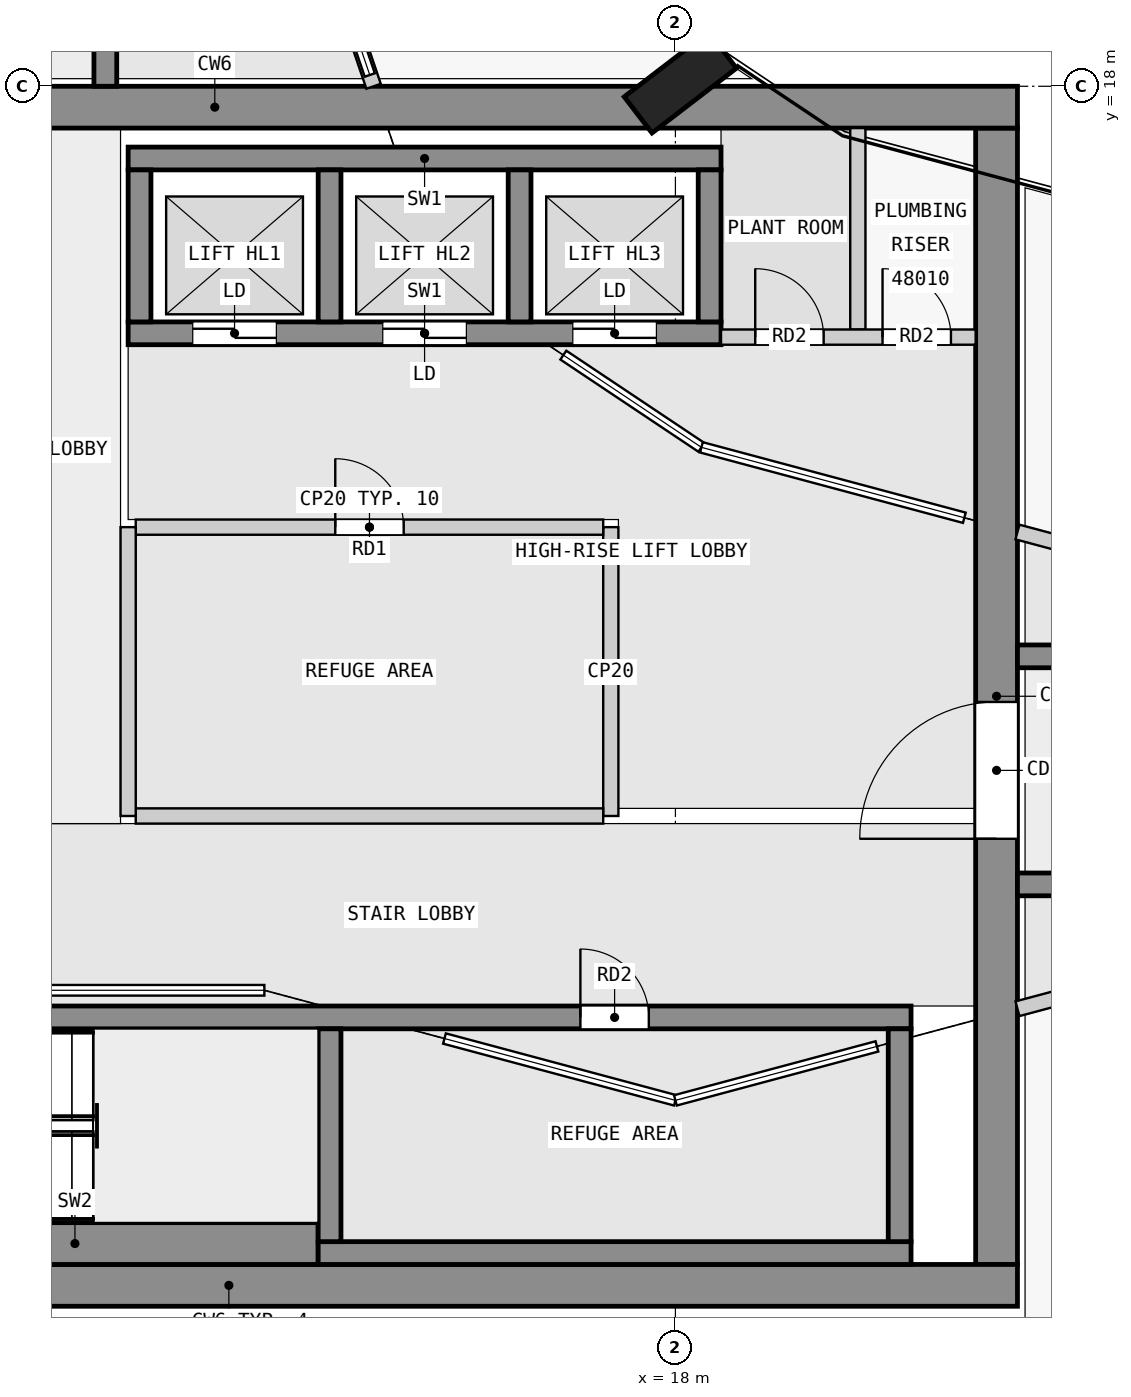
"""IFC4 building model, lengths in metres.
Left out: names, types, materials, properties, quantities, classifications, styles, units other than length and angle.
Written with IfcOpenShell. Run it as: python <this file> out.ifc"""

import sys

from ifc_helpers import new_model, si_unit, direction, frame, frame_2d, origin, origin_2d, place, context, subcontext, project, spatial, rectangle, extrude, element, fill, save


model = new_model("IFC4")
c1 = context("Model", 3, precision=1e-05, world=origin(), true_north=direction((0.0, 1.0)))
c2 = subcontext(c1, "Body", "Model", "MODEL_VIEW")
j1 = project(units=[si_unit("LENGTHUNIT", "METRE"), si_unit("PLANEANGLEUNIT", "RADIAN")], contexts=[c1])
p1 = place(None, origin())
s1 = spatial("IfcSite", under=j1, at=p1, CompositionType="ELEMENT")
p2 = place(p1, origin())
s2 = spatial("IfcBuilding", under=s1, at=p2, CompositionType="ELEMENT")
p3 = place(p2, frame((0.0, 0.0, 184.9)))
s3 = spatial("IfcBuildingStorey", under=s2, at=p3, CompositionType="ELEMENT", Elevation=184.9)
p4 = place(p3, frame((18.065, 18.05, 0.0), z_axis=(0.0, 0.0, 1.0), x_axis=(-0.608810846443, 0.793315418515, 0.0)))
e1 = element("IfcColumn", 1, at=p4, inside=s3, PredefinedType="COLUMN", context=c2, shape_type="SweptSolid", body=[
    extrude(rectangle(XDim=0.6, YDim=1.4, at=origin_2d()), origin(), (0.0, 0.0, 1.0), 6.0),
])
p5 = place(p3, frame((1.75, 2.225, 0.0), z_axis=(0.0, 0.0, 1.0), x_axis=(1.0, 0.0, 0.0)))
e2 = element("IfcWall", 2, at=p5, inside=s3, PredefinedType="SHEAR", context=c2, shape_type="SweptSolid", body=[
    extrude(rectangle(XDim=20.75, YDim=0.55, at=frame_2d((10.375, 0.0))), origin(), (0.0, 0.0, 1.0), 5.75),
])
p6 = place(p3, frame((1.38, 17.725, 0.0), z_axis=(0.0, 0.0, 1.0), x_axis=(1.0, 0.0, 0.0)))
e3 = element("IfcWall", 3, at=p6, inside=s3, PredefinedType="SHEAR", context=c2, shape_type="SweptSolid", body=[
    extrude(rectangle(XDim=21.12, YDim=0.55, at=frame_2d((10.56, 0.0))), origin(), (0.0, 0.0, 1.0), 5.75),
])
p7 = place(p6, frame((6.35, 0.0, 0.0)))
e4 = element("IfcOpeningElement", 4, at=p7, cuts=e3, PredefinedType="OPENING", context=c2, shape_type="SweptSolid", body=[
    extrude(rectangle(XDim=1.8, YDim=2.1, at=frame_2d((0.9, 1.05))), frame((0.0, 0.285, 0.0), z_axis=(0.0, -1.0, 0.0), x_axis=(1.0, 0.0, 0.0)), (0.0, 0.0, 1.0), 0.57),
])
p8 = place(p3, frame((22.225, 2.5, 0.0), z_axis=(0.0, 0.0, 1.0), x_axis=(0.0, 1.0, 0.0)))
e5 = element("IfcWall", 5, at=p8, inside=s3, PredefinedType="SHEAR", context=c2, shape_type="SweptSolid", body=[
    extrude(rectangle(XDim=14.95, YDim=0.55, at=frame_2d((7.475, 0.0))), origin(), (0.0, 0.0, 1.0), 5.75),
])
p9 = place(p8, frame((5.6, 0.0, 0.0)))
e6 = element("IfcOpeningElement", 6, at=p9, cuts=e5, PredefinedType="OPENING", context=c2, shape_type="SweptSolid", body=[
    extrude(rectangle(XDim=1.8, YDim=2.1, at=frame_2d((0.9, 1.05))), frame((0.0, 0.285, 0.0), z_axis=(0.0, -1.0, 0.0), x_axis=(1.0, 0.0, 0.0)), (0.0, 0.0, 1.0), 0.57),
])
p10 = place(p3, frame((6.9, 2.775, 0.0), z_axis=(0.0, 0.0, 1.0), x_axis=(1.0, 0.0, 0.0)))
e7 = element("IfcWall", 7, at=p10, inside=s3, PredefinedType="SHEAR", context=c2, shape_type="SweptSolid", body=[
    extrude(rectangle(XDim=6.4, YDim=0.55, at=frame_2d((3.2, 0.0))), origin(), (0.0, 0.0, 1.0), 5.75),
])
p11 = place(p3, frame((13.3, 2.65, 0.0), z_axis=(0.0, 0.0, 1.0), x_axis=(1.0, 0.0, 0.0)))
e8 = element("IfcWall", 8, at=p11, inside=s3, PredefinedType="SHEAR", context=c2, shape_type="SweptSolid", body=[
    extrude(rectangle(XDim=7.8, YDim=0.3, at=frame_2d((3.9, 0.0))), origin(), (0.0, 0.0, 1.0), 5.75),
])
for number, where, z_axis, x_axis in (
    (9, (13.45, 2.8, 0.0), (0.0, 0.0, 1.0), (0.0, 1.0, 0.0)),
    (10, (20.95, 2.8, 0.0), (0.0, 0.0, 1.0), (0.0, 1.0, 0.0)),
):
    element("IfcWall", number, at=place(p3, frame(where, z_axis=z_axis, x_axis=x_axis)), inside=s3, PredefinedType="SHEAR", context=c2, shape_type="SweptSolid", body=[
        extrude(rectangle(XDim=2.8, YDim=0.3, at=frame_2d((1.4, 0.0))), origin(), (0.0, 0.0, 1.0), 5.75),
    ])
p12 = place(p3, frame((2.3, 5.75, 0.0), z_axis=(0.0, 0.0, 1.0), x_axis=(1.0, 0.0, 0.0)))
e11 = element("IfcWall", 11, at=p12, inside=s3, PredefinedType="SHEAR", context=c2, shape_type="SweptSolid", body=[
    extrude(rectangle(XDim=18.8, YDim=0.3, at=frame_2d((9.4, 0.0))), origin(), (0.0, 0.0, 1.0), 5.75),
])
p13 = place(p12, frame((4.65, 0.0, 0.0)))
e12 = element("IfcOpeningElement", 12, at=p13, cuts=e11, PredefinedType="OPENING", context=c2, shape_type="SweptSolid", body=[
    extrude(rectangle(XDim=1.1, YDim=2.1, at=frame_2d((0.55, 1.05))), frame((0.0, 0.16, 0.0), z_axis=(0.0, -1.0, 0.0), x_axis=(1.0, 0.0, 0.0)), (0.0, 0.0, 1.0), 0.32),
])
p14 = place(p12, frame((0.45, 0.0, 0.0)))
e13 = element("IfcOpeningElement", 13, at=p14, cuts=e11, PredefinedType="OPENING", context=c2, shape_type="SweptSolid", body=[
    extrude(rectangle(XDim=1.1, YDim=2.1, at=frame_2d((0.55, 1.05))), frame((0.0, 0.16, 0.0), z_axis=(0.0, -1.0, 0.0), x_axis=(1.0, 0.0, 0.0)), (0.0, 0.0, 1.0), 0.32),
])
p15 = place(p12, frame((2.75, 0.0, 0.0)))
e14 = element("IfcOpeningElement", 14, at=p15, cuts=e11, PredefinedType="OPENING", context=c2, shape_type="SweptSolid", body=[
    extrude(rectangle(XDim=1.1, YDim=2.1, at=frame_2d((0.55, 1.05))), frame((0.0, 0.16, 0.0), z_axis=(0.0, -1.0, 0.0), x_axis=(1.0, 0.0, 0.0)), (0.0, 0.0, 1.0), 0.32),
])
p16 = place(p12, frame((14.45, 0.0, 0.0)))
e15 = element("IfcOpeningElement", 15, at=p16, cuts=e11, PredefinedType="OPENING", context=c2, shape_type="SweptSolid", body=[
    extrude(rectangle(XDim=0.9, YDim=2.1, at=frame_2d((0.45, 1.05))), frame((0.0, 0.16, 0.0), z_axis=(0.0, -1.0, 0.0), x_axis=(1.0, 0.0, 0.0)), (0.0, 0.0, 1.0), 0.32),
])
p17 = place(p3, frame((10.8, 17.05, 0.0), z_axis=(0.0, 0.0, 1.0), x_axis=(1.0, 0.0, 0.0)))
e16 = element("IfcWall", 16, at=p17, inside=s3, PredefinedType="SHEAR", context=c2, shape_type="SweptSolid", body=[
    extrude(rectangle(XDim=7.8, YDim=0.3, at=frame_2d((3.9, 0.0))), origin(), (0.0, 0.0, 1.0), 5.75),
])
p18 = place(p3, frame((10.8, 14.75, 0.0), z_axis=(0.0, 0.0, 1.0), x_axis=(1.0, 0.0, 0.0)))
e17 = element("IfcWall", 17, at=p18, inside=s3, PredefinedType="SHEAR", context=c2, shape_type="SweptSolid", body=[
    extrude(rectangle(XDim=7.8, YDim=0.3, at=frame_2d((3.9, 0.0))), origin(), (0.0, 0.0, 1.0), 5.75),
])
p19 = place(p18, frame((0.85, 0.0, 0.0)))
e18 = element("IfcOpeningElement", 18, at=p19, cuts=e17, PredefinedType="OPENING", context=c2, shape_type="SweptSolid", body=[
    extrude(rectangle(XDim=1.1, YDim=2.1, at=frame_2d((0.55, 1.05))), frame((0.0, 0.16, 0.0), z_axis=(0.0, -1.0, 0.0), x_axis=(1.0, 0.0, 0.0)), (0.0, 0.0, 1.0), 0.32),
])
p20 = place(p18, frame((3.35, 0.0, 0.0)))
e19 = element("IfcOpeningElement", 19, at=p20, cuts=e17, PredefinedType="OPENING", context=c2, shape_type="SweptSolid", body=[
    extrude(rectangle(XDim=1.1, YDim=2.1, at=frame_2d((0.55, 1.05))), frame((0.0, 0.16, 0.0), z_axis=(0.0, -1.0, 0.0), x_axis=(1.0, 0.0, 0.0)), (0.0, 0.0, 1.0), 0.32),
])
p21 = place(p18, frame((5.85, 0.0, 0.0)))
e20 = element("IfcOpeningElement", 20, at=p21, cuts=e17, PredefinedType="OPENING", context=c2, shape_type="SweptSolid", body=[
    extrude(rectangle(XDim=1.1, YDim=2.1, at=frame_2d((0.55, 1.05))), frame((0.0, 0.16, 0.0), z_axis=(0.0, -1.0, 0.0), x_axis=(1.0, 0.0, 0.0)), (0.0, 0.0, 1.0), 0.32),
])
for number, where, z_axis, x_axis in (
    (21, (10.95, 14.9, 0.0), (0.0, 0.0, 1.0), (0.0, 1.0, 0.0)),
    (22, (13.45, 14.9, 0.0), (0.0, 0.0, 1.0), (0.0, 1.0, 0.0)),
    (23, (15.95, 14.9, 0.0), (0.0, 0.0, 1.0), (0.0, 1.0, 0.0)),
    (24, (18.45, 14.9, 0.0), (0.0, 0.0, 1.0), (0.0, 1.0, 0.0)),
):
    element("IfcWall", number, at=place(p3, frame(where, z_axis=z_axis, x_axis=x_axis)), inside=s3, PredefinedType="SHEAR", context=c2, shape_type="SweptSolid", body=[
        extrude(rectangle(XDim=2.0, YDim=0.3, at=frame_2d((1.0, 0.0))), origin(), (0.0, 0.0, 1.0), 5.75),
    ])
p22 = place(p3, frame((22.5, 7.5, 0.0), z_axis=(0.0, 0.0, 1.0), x_axis=(1.0, 0.0, 0.0)))
e25 = element("IfcWall", 25, at=p22, inside=s3, PredefinedType="SHEAR", context=c2, shape_type="SweptSolid", body=[
    extrude(rectangle(XDim=22.5, YDim=0.3, at=frame_2d((11.25, 0.0))), origin(), (0.0, 0.0, 1.0), 5.75),
])
p23 = place(p22, frame((20.1, 0.0, 0.0)))
e26 = element("IfcOpeningElement", 26, at=p23, cuts=e25, PredefinedType="OPENING", context=c2, shape_type="SweptSolid", body=[
    extrude(rectangle(XDim=1.8, YDim=2.1, at=frame_2d((0.9, 1.05))), frame((0.0, 0.16, 0.0), z_axis=(0.0, -1.0, 0.0), x_axis=(1.0, 0.0, 0.0)), (0.0, 0.0, 1.0), 0.32),
])
p24 = place(p22, frame((6.1, 0.0, 0.0)))
e27 = element("IfcOpeningElement", 27, at=p24, cuts=e25, PredefinedType="OPENING", context=c2, shape_type="SweptSolid", body=[
    extrude(rectangle(XDim=1.1, YDim=2.1, at=frame_2d((0.55, 1.05))), frame((0.0, 0.16, 0.0), z_axis=(0.0, -1.0, 0.0), x_axis=(1.0, 0.0, 0.0)), (0.0, 0.0, 1.0), 0.32),
])
p25 = place(p22, frame((16.1, 0.0, 0.0)))
e28 = element("IfcOpeningElement", 28, at=p25, cuts=e25, PredefinedType="OPENING", context=c2, shape_type="SweptSolid", body=[
    extrude(rectangle(XDim=1.0, YDim=2.1, at=frame_2d((0.5, 1.05))), frame((0.0, 0.16, 0.0), z_axis=(0.0, -1.0, 0.0), x_axis=(1.0, 0.0, 0.0)), (0.0, 0.0, 1.0), 0.32),
])
p26 = place(p3, frame((22.5, 10.5, 0.0), z_axis=(0.0, 0.0, 1.0), x_axis=(1.0, 0.0, 0.0)))
e29 = element("IfcWall", 29, at=p26, inside=s3, PredefinedType="SHEAR", context=c2, shape_type="SweptSolid", body=[
    extrude(rectangle(XDim=22.5, YDim=0.3, at=frame_2d((11.25, 0.0))), origin(), (0.0, 0.0, 1.0), 5.75),
])
p27 = place(p26, frame((6.1, 0.0, 0.0)))
e30 = element("IfcOpeningElement", 30, at=p27, cuts=e29, PredefinedType="OPENING", context=c2, shape_type="SweptSolid", body=[
    extrude(rectangle(XDim=1.1, YDim=2.1, at=frame_2d((0.55, 1.05))), frame((0.0, 0.16, 0.0), z_axis=(0.0, -1.0, 0.0), x_axis=(1.0, 0.0, 0.0)), (0.0, 0.0, 1.0), 0.32),
])
p28 = place(p26, frame((14.85, 0.0, 0.0)))
e31 = element("IfcOpeningElement", 31, at=p28, cuts=e29, PredefinedType="OPENING", context=c2, shape_type="SweptSolid", body=[
    extrude(rectangle(XDim=1.6, YDim=2.4, at=frame_2d((0.8, 1.2))), frame((0.0, 0.16, 0.0), z_axis=(0.0, -1.0, 0.0), x_axis=(1.0, 0.0, 0.0)), (0.0, 0.0, 1.0), 0.32),
])
p29 = place(p26, frame((19.35, 0.0, 0.0)))
e32 = element("IfcOpeningElement", 32, at=p29, cuts=e29, PredefinedType="OPENING", context=c2, shape_type="SweptSolid", body=[
    extrude(rectangle(XDim=1.8, YDim=2.1, at=frame_2d((0.9, 1.05))), frame((0.0, 0.16, 0.0), z_axis=(0.0, -1.0, 0.0), x_axis=(1.0, 0.0, 0.0)), (0.0, 0.0, 1.0), 0.32),
])
p30 = place(p3, frame((10.5, 18.0, 0.0), z_axis=(0.0, 0.0, 1.0), x_axis=(0.0, 1.0, 0.0)))
e33 = element("IfcWall", 33, at=p30, inside=s3, PredefinedType="SHEAR", context=c2, shape_type="SweptSolid", body=[
    extrude(rectangle(XDim=27.0, YDim=0.3, at=frame_2d((13.5, 0.0))), origin(), (0.0, 0.0, 1.0), 5.75),
])
p31 = place(p30, frame((3.85, 0.0, 0.0)))
e34 = element("IfcOpeningElement", 34, at=p31, cuts=e33, PredefinedType="OPENING", context=c2, shape_type="SweptSolid", body=[
    extrude(rectangle(XDim=1.1, YDim=2.1, at=frame_2d((0.55, 1.05))), frame((0.0, 0.16, 0.0), z_axis=(0.0, -1.0, 0.0), x_axis=(1.0, 0.0, 0.0)), (0.0, 0.0, 1.0), 0.32),
])
p32 = place(p30, frame((10.85, 0.0, 0.0)))
e35 = element("IfcOpeningElement", 35, at=p32, cuts=e33, PredefinedType="OPENING", context=c2, shape_type="SweptSolid", body=[
    extrude(rectangle(XDim=1.0, YDim=2.1, at=frame_2d((0.5, 1.05))), frame((0.0, 0.16, 0.0), z_axis=(0.0, -1.0, 0.0), x_axis=(1.0, 0.0, 0.0)), (0.0, 0.0, 1.0), 0.32),
])
p33 = place(p30, frame((15.35, 0.0, 0.0)))
e36 = element("IfcOpeningElement", 36, at=p33, cuts=e33, PredefinedType="OPENING", context=c2, shape_type="SweptSolid", body=[
    extrude(rectangle(XDim=1.0, YDim=2.1, at=frame_2d((0.5, 1.05))), frame((0.0, 0.16, 0.0), z_axis=(0.0, -1.0, 0.0), x_axis=(1.0, 0.0, 0.0)), (0.0, 0.0, 1.0), 0.32),
])
p34 = place(p30, frame((19.35, 0.0, 0.0)))
e37 = element("IfcOpeningElement", 37, at=p34, cuts=e33, PredefinedType="OPENING", context=c2, shape_type="SweptSolid", body=[
    extrude(rectangle(XDim=1.6, YDim=2.4, at=frame_2d((0.8, 1.2))), frame((0.0, 0.16, 0.0), z_axis=(0.0, -1.0, 0.0), x_axis=(1.0, 0.0, 0.0)), (0.0, 0.0, 1.0), 0.32),
])
p35 = place(p30, frame((23.85, 0.0, 0.0)))
e38 = element("IfcOpeningElement", 38, at=p35, cuts=e33, PredefinedType="OPENING", context=c2, shape_type="SweptSolid", body=[
    extrude(rectangle(XDim=1.6, YDim=2.4, at=frame_2d((0.8, 1.2))), frame((0.0, 0.16, 0.0), z_axis=(0.0, -1.0, 0.0), x_axis=(1.0, 0.0, 0.0)), (0.0, 0.0, 1.0), 0.32),
])
p36 = place(p3, frame((10.8, 8.4, 0.0), z_axis=(0.0, 0.0, 1.0), x_axis=(0.0, 1.0, 0.0)))
e39 = element("IfcWall", 39, at=p36, inside=s3, PredefinedType="PARTITIONING", context=c2, shape_type="SweptSolid", body=[
    extrude(rectangle(XDim=3.8, YDim=0.2, at=frame_2d((1.9, 0.0))), origin(), (0.0, 0.0, 1.0), 5.75),
])
p37 = place(p3, frame((10.9, 8.4, 0.0), z_axis=(0.0, 0.0, 1.0), x_axis=(1.0, 0.0, 0.0)))
e40 = element("IfcWall", 40, at=p37, inside=s3, PredefinedType="PARTITIONING", context=c2, shape_type="SweptSolid", body=[
    extrude(rectangle(XDim=6.15, YDim=0.2, at=frame_2d((3.075, 0.0))), origin(), (0.0, 0.0, 1.0), 5.75),
])
p38 = place(p3, frame((17.15, 8.4, 0.0), z_axis=(0.0, 0.0, 1.0), x_axis=(0.0, 1.0, 0.0)))
e41 = element("IfcWall", 41, at=p38, inside=s3, PredefinedType="PARTITIONING", context=c2, shape_type="SweptSolid", body=[
    extrude(rectangle(XDim=3.8, YDim=0.2, at=frame_2d((1.9, 0.0))), origin(), (0.0, 0.0, 1.0), 5.75),
])
p39 = place(p3, frame((10.9, 12.2, 0.0), z_axis=(0.0, 0.0, 1.0), x_axis=(1.0, 0.0, 0.0)))
e42 = element("IfcWall", 42, at=p39, inside=s3, PredefinedType="PARTITIONING", context=c2, shape_type="SweptSolid", body=[
    extrude(rectangle(XDim=6.15, YDim=0.2, at=frame_2d((3.075, 0.0))), origin(), (0.0, 0.0, 1.0), 5.75),
])
p40 = place(p39, frame((2.625, 0.0, 0.0)))
e43 = element("IfcOpeningElement", 43, at=p40, cuts=e42, PredefinedType="OPENING", context=c2, shape_type="SweptSolid", body=[
    extrude(rectangle(XDim=0.9, YDim=2.1, at=frame_2d((0.45, 1.05))), frame((0.0, 0.11, 0.0), z_axis=(0.0, -1.0, 0.0), x_axis=(1.0, 0.0, 0.0)), (0.0, 0.0, 1.0), 0.22),
])
p41 = place(p3, frame((18.6, 14.7, 0.0), z_axis=(0.0, 0.0, 1.0), x_axis=(1.0, 0.0, 0.0)))
e44 = element("IfcWall", 44, at=p41, inside=s3, PredefinedType="PARTITIONING", context=c2, shape_type="SweptSolid", body=[
    extrude(rectangle(XDim=3.35, YDim=0.2, at=frame_2d((1.675, 0.0))), origin(), (0.0, 0.0, 1.0), 5.75),
])
p42 = place(p41, frame((0.45, 0.0, 0.0)))
e45 = element("IfcOpeningElement", 45, at=p42, cuts=e44, PredefinedType="OPENING", context=c2, shape_type="SweptSolid", body=[
    extrude(rectangle(XDim=0.9, YDim=2.1, at=frame_2d((0.45, 1.05))), frame((0.0, 0.11, 0.0), z_axis=(0.0, -1.0, 0.0), x_axis=(1.0, 0.0, 0.0)), (0.0, 0.0, 1.0), 0.22),
])
p43 = place(p41, frame((2.125, 0.0, 0.0)))
e46 = element("IfcOpeningElement", 46, at=p43, cuts=e44, PredefinedType="OPENING", context=c2, shape_type="SweptSolid", body=[
    extrude(rectangle(XDim=0.9, YDim=2.1, at=frame_2d((0.45, 1.05))), frame((0.0, 0.11, 0.0), z_axis=(0.0, -1.0, 0.0), x_axis=(1.0, 0.0, 0.0)), (0.0, 0.0, 1.0), 0.22),
])
p44 = place(p3, frame((20.4, 14.8, 0.0), z_axis=(0.0, 0.0, 1.0), x_axis=(0.0, 1.0, 0.0)))
e47 = element("IfcWall", 47, at=p44, inside=s3, PredefinedType="PARTITIONING", context=c2, shape_type="SweptSolid", body=[
    extrude(rectangle(XDim=2.65, YDim=0.2, at=frame_2d((1.325, 0.0))), origin(), (0.0, 0.0, 1.0), 5.75),
])
for number, where, z_axis, x_axis in (
    (48, (22.5, 5.864, 0.0), (0.0, 0.0, 1.0), (0.966, 0.258, 0.0)),
    (49, (23.408, 11.893, 0.0), (0.0, 0.0, 1.0), (-0.966, 0.258, 0.0)),
):
    element("IfcWall", number, at=place(p3, frame(where, z_axis=z_axis, x_axis=x_axis)), inside=s3, PredefinedType="PARTITIONING", context=c2, shape_type="SweptSolid", body=[
        extrude(rectangle(XDim=0.94, YDim=0.2, at=frame_2d((0.47, 0.0))), origin(), (0.0, 0.0, 1.0), 5.75),
    ])
p45 = place(p3, frame((14.029, 18.0, 0.0), z_axis=(0.0, 0.0, 1.0), x_axis=(-0.32133908787, 0.946964197109, 0.0)))
e50 = element("IfcWall", 50, at=p45, inside=s3, PredefinedType="PARTITIONING", context=c2, shape_type="SweptSolid", body=[
    extrude(rectangle(XDim=1.646, YDim=0.2, at=frame_2d((0.823, 0.0))), origin(), (0.0, 0.0, 1.0), 5.75),
])
p46 = place(p40, origin())
e51 = element("IfcDoor", 51, at=p46, inside=s3, OperationType="SINGLE_SWING_LEFT", PredefinedType="DOOR", context=c2, shape_type="SweptSolid", body=[
    extrude(rectangle(XDim=0.9, YDim=2.1, at=frame_2d((0.45, 1.05))), frame((0.0, 0.025, 0.0), z_axis=(0.0, -1.0, 0.0), x_axis=(1.0, 0.0, 0.0)), (0.0, 0.0, 1.0), 0.05),
])
fill(e43, e51)
p47 = place(p19, origin())
e52 = element("IfcDoor", 52, at=p47, inside=s3, OperationType="DOUBLE_DOOR_SLIDING", PredefinedType="DOOR", context=c2, shape_type="SweptSolid", body=[
    extrude(rectangle(XDim=1.1, YDim=2.1, at=frame_2d((0.55, 1.05))), frame((0.0, 0.025, 0.0), z_axis=(0.0, -1.0, 0.0), x_axis=(1.0, 0.0, 0.0)), (0.0, 0.0, 1.0), 0.05),
])
fill(e18, e52)
p48 = place(p20, origin())
e53 = element("IfcDoor", 53, at=p48, inside=s3, OperationType="DOUBLE_DOOR_SLIDING", PredefinedType="DOOR", context=c2, shape_type="SweptSolid", body=[
    extrude(rectangle(XDim=1.1, YDim=2.1, at=frame_2d((0.55, 1.05))), frame((0.0, 0.025, 0.0), z_axis=(0.0, -1.0, 0.0), x_axis=(1.0, 0.0, 0.0)), (0.0, 0.0, 1.0), 0.05),
])
fill(e19, e53)
p49 = place(p21, origin())
e54 = element("IfcDoor", 54, at=p49, inside=s3, OperationType="DOUBLE_DOOR_SLIDING", PredefinedType="DOOR", context=c2, shape_type="SweptSolid", body=[
    extrude(rectangle(XDim=1.1, YDim=2.1, at=frame_2d((0.55, 1.05))), frame((0.0, 0.025, 0.0), z_axis=(0.0, -1.0, 0.0), x_axis=(1.0, 0.0, 0.0)), (0.0, 0.0, 1.0), 0.05),
])
fill(e20, e54)
p50 = place(p9, origin())
e55 = element("IfcDoor", 55, at=p50, inside=s3, OperationType="DOUBLE_DOOR_SINGLE_SWING", PredefinedType="DOOR", context=c2, shape_type="SweptSolid", body=[
    extrude(rectangle(XDim=1.8, YDim=2.1, at=frame_2d((0.9, 1.05))), frame((0.0, 0.025, 0.0), z_axis=(0.0, -1.0, 0.0), x_axis=(1.0, 0.0, 0.0)), (0.0, 0.0, 1.0), 0.05),
])
fill(e6, e55)
p51 = place(p42, origin())
e56 = element("IfcDoor", 56, at=p51, inside=s3, OperationType="SINGLE_SWING_LEFT", PredefinedType="DOOR", context=c2, shape_type="SweptSolid", body=[
    extrude(rectangle(XDim=0.9, YDim=2.1, at=frame_2d((0.45, 1.05))), frame((0.0, 0.025, 0.0), z_axis=(0.0, -1.0, 0.0), x_axis=(1.0, 0.0, 0.0)), (0.0, 0.0, 1.0), 0.05),
])
fill(e45, e56)
p52 = place(p43, origin())
e57 = element("IfcDoor", 57, at=p52, inside=s3, OperationType="SINGLE_SWING_LEFT", PredefinedType="DOOR", context=c2, shape_type="SweptSolid", body=[
    extrude(rectangle(XDim=0.9, YDim=2.1, at=frame_2d((0.45, 1.05))), frame((0.0, 0.025, 0.0), z_axis=(0.0, -1.0, 0.0), x_axis=(1.0, 0.0, 0.0)), (0.0, 0.0, 1.0), 0.05),
])
fill(e46, e57)
p53 = place(p16, origin())
e58 = element("IfcDoor", 58, at=p53, inside=s3, OperationType="SINGLE_SWING_LEFT", PredefinedType="DOOR", context=c2, shape_type="SweptSolid", body=[
    extrude(rectangle(XDim=0.9, YDim=2.1, at=frame_2d((0.45, 1.05))), frame((0.0, 0.025, 0.0), z_axis=(0.0, -1.0, 0.0), x_axis=(1.0, 0.0, 0.0)), (0.0, 0.0, 1.0), 0.05),
])
fill(e15, e58)
save(model, sys.argv[1])
